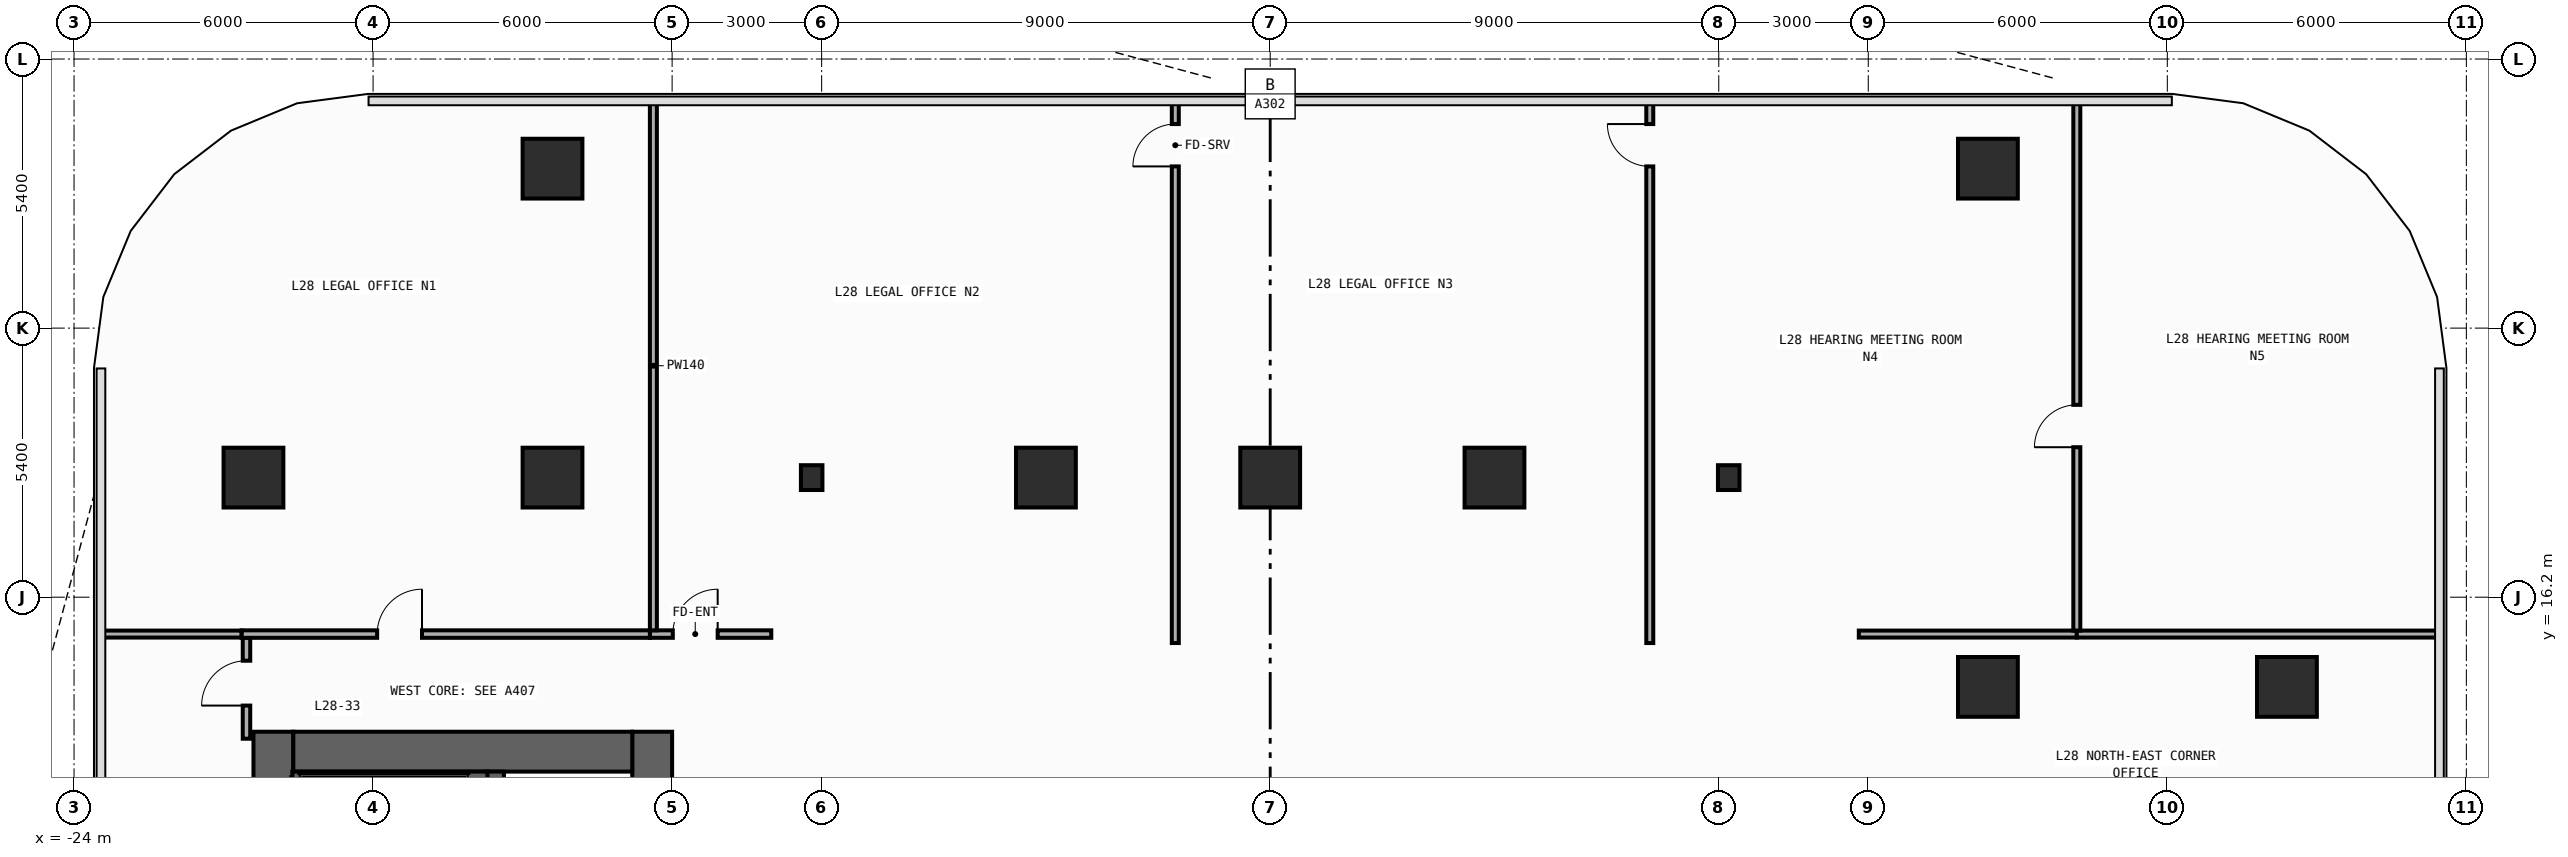
"""IFC4 building model, lengths in metres.
Left out: names, types, materials, properties, quantities, classifications, styles, units other than length and angle.
Written with IfcOpenShell. Run it as: python <this file> out.ifc"""

import sys

from ifc_helpers import new_model, si_unit, direction, frame, frame_2d, origin, origin_2d, place, context, subcontext, project, spatial, rectangle, i_section, extrude, element, fill, save


model = new_model("IFC4")
c1 = context("Model", 3, precision=1e-05, world=origin(), true_north=direction((0.0, 1.0)))
c2 = subcontext(c1, "Body", "Model", "MODEL_VIEW")
j1 = project(units=[si_unit("LENGTHUNIT", "METRE"), si_unit("PLANEANGLEUNIT", "RADIAN")], contexts=[c1])
p1 = place(None, origin())
s1 = spatial("IfcSite", under=j1, at=p1, CompositionType="ELEMENT")
p2 = place(p1, origin())
s2 = spatial("IfcBuilding", under=s1, at=p2, CompositionType="ELEMENT")
p3 = place(p2, frame((0.0, 0.0, 122.6)))
s3 = spatial("IfcBuildingStorey", under=s2, at=p3, CompositionType="ELEMENT", Elevation=122.6)
p4 = place(p3, frame((-20.0, -13.5, 0.0), z_axis=(0.0, 0.0, 1.0), x_axis=(0.0, 1.0, 0.0)))
e1 = element("IfcWall", 1, at=p4, inside=s3, PredefinedType="SHEAR", context=c2, shape_type="SweptSolid", body=[
    extrude(rectangle(XDim=27.0, YDim=0.8, at=frame_2d((13.5, 0.0))), origin(), (0.0, 0.0, 1.0), 3.94),
])
p5 = place(p3, frame((-12.4, -13.5, 0.0), z_axis=(0.0, 0.0, 1.0), x_axis=(0.0, 1.0, 0.0)))
e2 = element("IfcWall", 2, at=p5, inside=s3, PredefinedType="SHEAR", context=c2, shape_type="SweptSolid", body=[
    extrude(rectangle(XDim=27.0, YDim=0.8, at=frame_2d((13.5, 0.0))), origin(), (0.0, 0.0, 1.0), 3.94),
])
p6 = place(p5, frame((10.35, 0.0, 0.0)))
e3 = element("IfcOpeningElement", 3, at=p6, cuts=e2, PredefinedType="OPENING", context=c2, shape_type="SweptSolid", body=[
    extrude(rectangle(XDim=1.1, YDim=2.2, at=frame_2d((0.55, 1.1))), frame((0.0, 0.41, 0.0), z_axis=(0.0, -1.0, 0.0), x_axis=(1.0, 0.0, 0.0)), (0.0, 0.0, 1.0), 0.82),
])
p7 = place(p5, frame((7.15, 0.0, 0.0)))
e4 = element("IfcOpeningElement", 4, at=p7, cuts=e2, PredefinedType="OPENING", context=c2, shape_type="SweptSolid", body=[
    extrude(rectangle(XDim=1.1, YDim=2.2, at=frame_2d((0.55, 1.1))), frame((0.0, 0.41, 0.0), z_axis=(0.0, -1.0, 0.0), x_axis=(1.0, 0.0, 0.0)), (0.0, 0.0, 1.0), 0.82),
])
p8 = place(p5, frame((3.95, 0.0, 0.0)))
e5 = element("IfcOpeningElement", 5, at=p8, cuts=e2, PredefinedType="OPENING", context=c2, shape_type="SweptSolid", body=[
    extrude(rectangle(XDim=1.1, YDim=2.2, at=frame_2d((0.55, 1.1))), frame((0.0, 0.41, 0.0), z_axis=(0.0, -1.0, 0.0), x_axis=(1.0, 0.0, 0.0)), (0.0, 0.0, 1.0), 0.82),
])
p9 = place(p5, frame((15.175, 0.0, 0.0)))
e6 = element("IfcOpeningElement", 6, at=p9, cuts=e2, PredefinedType="OPENING", context=c2, shape_type="SweptSolid", body=[
    extrude(rectangle(XDim=0.85, YDim=2.1, at=frame_2d((0.425, 1.05))), frame((0.0, 0.41, 0.0), z_axis=(0.0, -1.0, 0.0), x_axis=(1.0, 0.0, 0.0)), (0.0, 0.0, 1.0), 0.82),
])
p10 = place(p5, frame((21.275, 0.0, 0.0)))
e7 = element("IfcOpeningElement", 7, at=p10, cuts=e2, PredefinedType="OPENING", context=c2, shape_type="SweptSolid", body=[
    extrude(rectangle(XDim=0.85, YDim=2.1, at=frame_2d((0.425, 1.05))), frame((0.0, 0.41, 0.0), z_axis=(0.0, -1.0, 0.0), x_axis=(1.0, 0.0, 0.0)), (0.0, 0.0, 1.0), 0.82),
])
p11 = place(p5, frame((12.725, 0.0, 0.0)))
e8 = element("IfcOpeningElement", 8, at=p11, cuts=e2, PredefinedType="OPENING", context=c2, shape_type="SweptSolid", body=[
    extrude(rectangle(XDim=1.15, YDim=2.2, at=frame_2d((0.575, 1.1))), frame((0.0, 0.41, 0.0), z_axis=(0.0, -1.0, 0.0), x_axis=(1.0, 0.0, 0.0)), (0.0, 0.0, 1.0), 0.82),
])
p12 = place(p5, frame((1.625, 0.0, 0.0)))
e9 = element("IfcOpeningElement", 9, at=p12, cuts=e2, PredefinedType="OPENING", context=c2, shape_type="SweptSolid", body=[
    extrude(rectangle(XDim=0.85, YDim=2.1, at=frame_2d((0.425, 1.05))), frame((0.0, 0.41, 0.0), z_axis=(0.0, -1.0, 0.0), x_axis=(1.0, 0.0, 0.0)), (0.0, 0.0, 1.0), 0.82),
])
p13 = place(p3, frame((-19.6, 13.1, 0.0), z_axis=(0.0, 0.0, 1.0), x_axis=(1.0, 0.0, 0.0)))
e10 = element("IfcWall", 10, at=p13, inside=s3, PredefinedType="SHEAR", context=c2, shape_type="SweptSolid", body=[
    extrude(rectangle(XDim=6.8, YDim=0.8, at=frame_2d((3.4, 0.0))), origin(), (0.0, 0.0, 1.0), 3.94),
])
p14 = place(p3, frame((-15.55, -12.7, 0.0), z_axis=(0.0, 0.0, 1.0), x_axis=(0.0, 1.0, 0.0)))
e11 = element("IfcWall", 11, at=p14, inside=s3, PredefinedType="SHEAR", context=c2, shape_type="SweptSolid", body=[
    extrude(rectangle(XDim=25.4, YDim=0.35, at=frame_2d((12.7, 0.0))), origin(), (0.0, 0.0, 1.0), 3.94),
])
p15 = place(p14, frame((11.925, 0.0, 0.0)))
e12 = element("IfcOpeningElement", 12, at=p15, cuts=e11, PredefinedType="OPENING", context=c2, shape_type="SweptSolid", body=[
    extrude(rectangle(XDim=1.15, YDim=2.2, at=frame_2d((0.575, 1.1))), frame((0.0, 0.185, 0.0), z_axis=(0.0, -1.0, 0.0), x_axis=(1.0, 0.0, 0.0)), (0.0, 0.0, 1.0), 0.37),
])
p16 = place(p14, frame((0.825, 0.0, 0.0)))
e13 = element("IfcOpeningElement", 13, at=p16, cuts=e11, PredefinedType="OPENING", context=c2, shape_type="SweptSolid", body=[
    extrude(rectangle(XDim=0.85, YDim=2.1, at=frame_2d((0.425, 1.05))), frame((0.0, 0.185, 0.0), z_axis=(0.0, -1.0, 0.0), x_axis=(1.0, 0.0, 0.0)), (0.0, 0.0, 1.0), 0.37),
])
p17 = place(p3, frame((-19.62, 12.59, 0.0), z_axis=(0.0, 0.0, 1.0), x_axis=(1.0, 0.0, 0.0)))
e14 = element("IfcWall", 14, at=p17, inside=s3, PredefinedType="SHEAR", context=c2, shape_type="SweptSolid", body=[
    extrude(rectangle(XDim=3.915, YDim=0.22, at=frame_2d((1.958, 0.0))), origin(), (0.0, 0.0, 1.0), 3.94),
])
for number, where, z_axis, x_axis in (
    (15, (-9.2, 18.6, 0.0), (0.0, 0.0, 1.0), (1.0, 0.0, 0.0)),
    (16, (9.2, 18.6, 0.0), (0.0, 0.0, 1.0), (1.0, 0.0, 0.0)),
):
    element("IfcColumn", number, at=place(p3, frame(where, z_axis=z_axis, x_axis=x_axis)), inside=s3, PredefinedType="COLUMN", context=c2, shape_type="SweptSolid", body=[
        extrude(i_section(OverallWidth=0.432, OverallDepth=0.498, WebThickness=0.045, FlangeThickness=0.07, FilletRadius=0.022, at=origin_2d()), origin(), (0.0, 0.0, 1.0), 4.2),
    ])
for number, where, z_axis, x_axis in (
    (17, (-20.4, 18.6, 0.0), (0.0, 0.0, 1.0), (1.0, 0.0, 0.0)),
    (18, (20.4, 14.4, 0.0), (0.0, 0.0, 1.0), (1.0, 0.0, 0.0)),
    (19, (-14.4, 18.6, 0.0), (0.0, 0.0, 1.0), (1.0, 0.0, 0.0)),
    (20, (14.4, 14.4, 0.0), (0.0, 0.0, 1.0), (1.0, 0.0, 0.0)),
    (21, (-4.5, 18.6, 0.0), (0.0, 0.0, 1.0), (1.0, 0.0, 0.0)),
    (22, (0.0, 18.6, 0.0), (0.0, 0.0, 1.0), (1.0, 0.0, 0.0)),
    (23, (4.5, 18.6, 0.0), (0.0, 0.0, 1.0), (1.0, 0.0, 0.0)),
    (24, (-14.4, 24.8, 0.0), (0.0, 0.0, 1.0), (1.0, 0.0, 0.0)),
    (25, (14.4, 24.8, 0.0), (0.0, 0.0, 1.0), (1.0, 0.0, 0.0)),
):
    element("IfcColumn", number, at=place(p3, frame(where, z_axis=z_axis, x_axis=x_axis)), inside=s3, PredefinedType="COLUMN", context=c2, shape_type="SweptSolid", body=[
        extrude(rectangle(XDim=1.2, YDim=1.2, at=origin_2d()), origin(), (0.0, 0.0, 1.0), 4.2),
    ])
p18 = place(p3, frame((-12.446, 15.46, 0.0), z_axis=(0.0, 0.0, 1.0), x_axis=(1.0, 0.0, 0.0)))
e26 = element("IfcWall", 26, at=p18, inside=s3, PredefinedType="PARTITIONING", context=c2, shape_type="SweptSolid", body=[
    extrude(rectangle(XDim=2.436, YDim=0.15, at=frame_2d((1.218, 0.0))), origin(), (0.0, 0.0, 1.0), 3.94),
])
p19 = place(p18, frame((0.46, 0.0, 0.0)))
e27 = element("IfcOpeningElement", 27, at=p19, cuts=e26, PredefinedType="OPENING", context=c2, shape_type="SweptSolid", body=[
    extrude(rectangle(XDim=0.9, YDim=2.15, at=frame_2d((0.45, 1.075))), frame((0.0, 0.085, 0.0), z_axis=(0.0, -1.0, 0.0), x_axis=(1.0, 0.0, 0.0)), (0.0, 0.0, 1.0), 0.17),
])
p20 = place(p3, frame((-20.54, 13.36, 0.0), z_axis=(0.0, 0.0, 1.0), x_axis=(0.0, 1.0, 0.0)))
e28 = element("IfcWall", 28, at=p20, inside=s3, PredefinedType="PARTITIONING", context=c2, shape_type="SweptSolid", body=[
    extrude(rectangle(XDim=2.025, YDim=0.15, at=frame_2d((1.012, 0.0))), origin(), (0.0, 0.0, 1.0), 3.94),
])
p21 = place(p20, frame((0.665, 0.0, 0.0)))
e29 = element("IfcOpeningElement", 29, at=p21, cuts=e28, PredefinedType="OPENING", context=c2, shape_type="SweptSolid", body=[
    extrude(rectangle(XDim=0.9, YDim=2.15, at=frame_2d((0.45, 1.075))), frame((0.0, 0.085, 0.0), z_axis=(0.0, -1.0, 0.0), x_axis=(1.0, 0.0, 0.0)), (0.0, 0.0, 1.0), 0.17),
])
p22 = place(p3, frame((-20.64, 15.46, 0.0), z_axis=(0.0, 0.0, 1.0), x_axis=(1.0, 0.0, 0.0)))
e30 = element("IfcWall", 30, at=p22, inside=s3, PredefinedType="PARTITIONING", context=c2, shape_type="SweptSolid", body=[
    extrude(rectangle(XDim=8.194, YDim=0.15, at=frame_2d((4.097, 0.0))), origin(), (0.0, 0.0, 1.0), 3.94),
])
p23 = place(p22, frame((2.722, 0.0, 0.0)))
e31 = element("IfcOpeningElement", 31, at=p23, cuts=e30, PredefinedType="OPENING", context=c2, shape_type="SweptSolid", body=[
    extrude(rectangle(XDim=0.9, YDim=2.15, at=frame_2d((0.45, 1.075))), frame((0.0, 0.085, 0.0), z_axis=(0.0, -1.0, 0.0), x_axis=(1.0, 0.0, 0.0)), (0.0, 0.0, 1.0), 0.17),
])
p24 = place(p3, frame((-23.455, 15.46, 0.0), z_axis=(0.0, 0.0, 1.0), x_axis=(1.0, 0.0, 0.0)))
e32 = element("IfcWall", 32, at=p24, inside=s3, PredefinedType="PARTITIONING", context=c2, shape_type="SweptSolid", body=[
    extrude(rectangle(XDim=2.815, YDim=0.14, at=frame_2d((1.408, 0.0))), origin(), (0.0, 0.0, 1.0), 3.94),
])
p25 = place(p3, frame((11.81, 15.46, 0.0), z_axis=(0.0, 0.0, 1.0), x_axis=(1.0, 0.0, 0.0)))
e33 = element("IfcWall", 33, at=p25, inside=s3, PredefinedType="PARTITIONING", context=c2, shape_type="SweptSolid", body=[
    extrude(rectangle(XDim=4.374, YDim=0.14, at=frame_2d((2.187, 0.0))), origin(), (0.0, 0.0, 1.0), 3.94),
])
p26 = place(p3, frame((16.184, 15.46, 0.0), z_axis=(0.0, 0.0, 1.0), x_axis=(1.0, 0.0, 0.0)))
e34 = element("IfcWall", 34, at=p26, inside=s3, PredefinedType="PARTITIONING", context=c2, shape_type="SweptSolid", body=[
    extrude(rectangle(XDim=7.271, YDim=0.14, at=frame_2d((3.635, 0.0))), origin(), (0.0, 0.0, 1.0), 3.94),
])
p27 = place(p3, frame((-12.376, 15.535, 0.0), z_axis=(0.0, 0.0, 1.0), x_axis=(0.0, 1.0, 0.0)))
e35 = element("IfcWall", 35, at=p27, inside=s3, PredefinedType="PARTITIONING", context=c2, shape_type="SweptSolid", body=[
    extrude(rectangle(XDim=10.62, YDim=0.14, at=frame_2d((5.31, 0.0))), origin(), (0.0, 0.0, 1.0), 3.94),
])
p28 = place(p3, frame((-1.904, 15.28, 0.0), z_axis=(0.0, 0.0, 1.0), x_axis=(0.0, 1.0, 0.0)))
e36 = element("IfcWall", 36, at=p28, inside=s3, PredefinedType="PARTITIONING", context=c2, shape_type="SweptSolid", body=[
    extrude(rectangle(XDim=10.875, YDim=0.14, at=frame_2d((5.438, 0.0))), origin(), (0.0, 0.0, 1.0), 3.94),
])
p29 = place(p28, frame((9.565, 0.0, 0.0)))
e37 = element("IfcOpeningElement", 37, at=p29, cuts=e36, PredefinedType="OPENING", context=c2, shape_type="SweptSolid", body=[
    extrude(rectangle(XDim=0.85, YDim=2.1, at=frame_2d((0.425, 1.05))), frame((0.0, 0.08, 0.0), z_axis=(0.0, -1.0, 0.0), x_axis=(1.0, 0.0, 0.0)), (0.0, 0.0, 1.0), 0.16),
])
p30 = place(p3, frame((7.616, 15.28, 0.0), z_axis=(0.0, 0.0, 1.0), x_axis=(0.0, 1.0, 0.0)))
e38 = element("IfcWall", 38, at=p30, inside=s3, PredefinedType="PARTITIONING", context=c2, shape_type="SweptSolid", body=[
    extrude(rectangle(XDim=10.875, YDim=0.14, at=frame_2d((5.438, 0.0))), origin(), (0.0, 0.0, 1.0), 3.94),
])
p31 = place(p30, frame((9.565, 0.0, 0.0)))
e39 = element("IfcOpeningElement", 39, at=p31, cuts=e38, PredefinedType="OPENING", context=c2, shape_type="SweptSolid", body=[
    extrude(rectangle(XDim=0.85, YDim=2.1, at=frame_2d((0.425, 1.05))), frame((0.0, 0.08, 0.0), z_axis=(0.0, -1.0, 0.0), x_axis=(1.0, 0.0, 0.0)), (0.0, 0.0, 1.0), 0.16),
])
p32 = place(p3, frame((16.184, 15.53, 0.0), z_axis=(0.0, 0.0, 1.0), x_axis=(0.0, 1.0, 0.0)))
e40 = element("IfcWall", 40, at=p32, inside=s3, PredefinedType="PARTITIONING", context=c2, shape_type="SweptSolid", body=[
    extrude(rectangle(XDim=10.625, YDim=0.14, at=frame_2d((5.312, 0.0))), origin(), (0.0, 0.0, 1.0), 3.94),
])
p33 = place(p32, frame((3.68, 0.0, 0.0)))
e41 = element("IfcOpeningElement", 41, at=p33, cuts=e40, PredefinedType="OPENING", context=c2, shape_type="SweptSolid", body=[
    extrude(rectangle(XDim=0.85, YDim=2.1, at=frame_2d((0.425, 1.05))), frame((0.0, 0.08, 0.0), z_axis=(0.0, -1.0, 0.0), x_axis=(1.0, 0.0, 0.0)), (0.0, 0.0, 1.0), 0.16),
])
p34 = place(p19, origin())
e42 = element("IfcDoor", 42, at=p34, inside=s3, OperationType="SINGLE_SWING_RIGHT", PredefinedType="DOOR", context=c2, shape_type="SweptSolid", body=[
    extrude(rectangle(XDim=0.9, YDim=2.15, at=frame_2d((0.45, 1.075))), frame((0.0, 0.025, 0.0), z_axis=(0.0, -1.0, 0.0), x_axis=(1.0, 0.0, 0.0)), (0.0, 0.0, 1.0), 0.05),
])
fill(e27, e42)
p35 = place(p21, origin())
e43 = element("IfcDoor", 43, at=p35, inside=s3, OperationType="SINGLE_SWING_LEFT", PredefinedType="DOOR", context=c2, shape_type="SweptSolid", body=[
    extrude(rectangle(XDim=0.9, YDim=2.15, at=frame_2d((0.45, 1.075))), frame((0.0, 0.025, 0.0), z_axis=(0.0, -1.0, 0.0), x_axis=(1.0, 0.0, 0.0)), (0.0, 0.0, 1.0), 0.05),
])
fill(e29, e43)
p36 = place(p23, origin())
e44 = element("IfcDoor", 44, at=p36, inside=s3, OperationType="SINGLE_SWING_RIGHT", PredefinedType="DOOR", context=c2, shape_type="SweptSolid", body=[
    extrude(rectangle(XDim=0.9, YDim=2.15, at=frame_2d((0.45, 1.075))), frame((0.0, 0.025, 0.0), z_axis=(0.0, -1.0, 0.0), x_axis=(1.0, 0.0, 0.0)), (0.0, 0.0, 1.0), 0.05),
])
fill(e31, e44)
p37 = place(p29, origin())
e45 = element("IfcDoor", 45, at=p37, inside=s3, OperationType="SINGLE_SWING_LEFT", PredefinedType="DOOR", context=c2, shape_type="SweptSolid", body=[
    extrude(rectangle(XDim=0.85, YDim=2.1, at=frame_2d((0.425, 1.05))), frame((0.0, 0.025, 0.0), z_axis=(0.0, -1.0, 0.0), x_axis=(1.0, 0.0, 0.0)), (0.0, 0.0, 1.0), 0.05),
])
fill(e37, e45)
p38 = place(p31, origin())
e46 = element("IfcDoor", 46, at=p38, inside=s3, OperationType="SINGLE_SWING_RIGHT", PredefinedType="DOOR", context=c2, shape_type="SweptSolid", body=[
    extrude(rectangle(XDim=0.85, YDim=2.1, at=frame_2d((0.425, 1.05))), frame((0.0, 0.025, 0.0), z_axis=(0.0, -1.0, 0.0), x_axis=(1.0, 0.0, 0.0)), (0.0, 0.0, 1.0), 0.05),
])
fill(e39, e46)
p39 = place(p33, origin())
e47 = element("IfcDoor", 47, at=p39, inside=s3, OperationType="SINGLE_SWING_LEFT", PredefinedType="DOOR", context=c2, shape_type="SweptSolid", body=[
    extrude(rectangle(XDim=0.85, YDim=2.1, at=frame_2d((0.425, 1.05))), frame((0.0, 0.025, 0.0), z_axis=(0.0, -1.0, 0.0), x_axis=(1.0, 0.0, 0.0)), (0.0, 0.0, 1.0), 0.05),
])
fill(e41, e47)
save(model, sys.argv[1])
